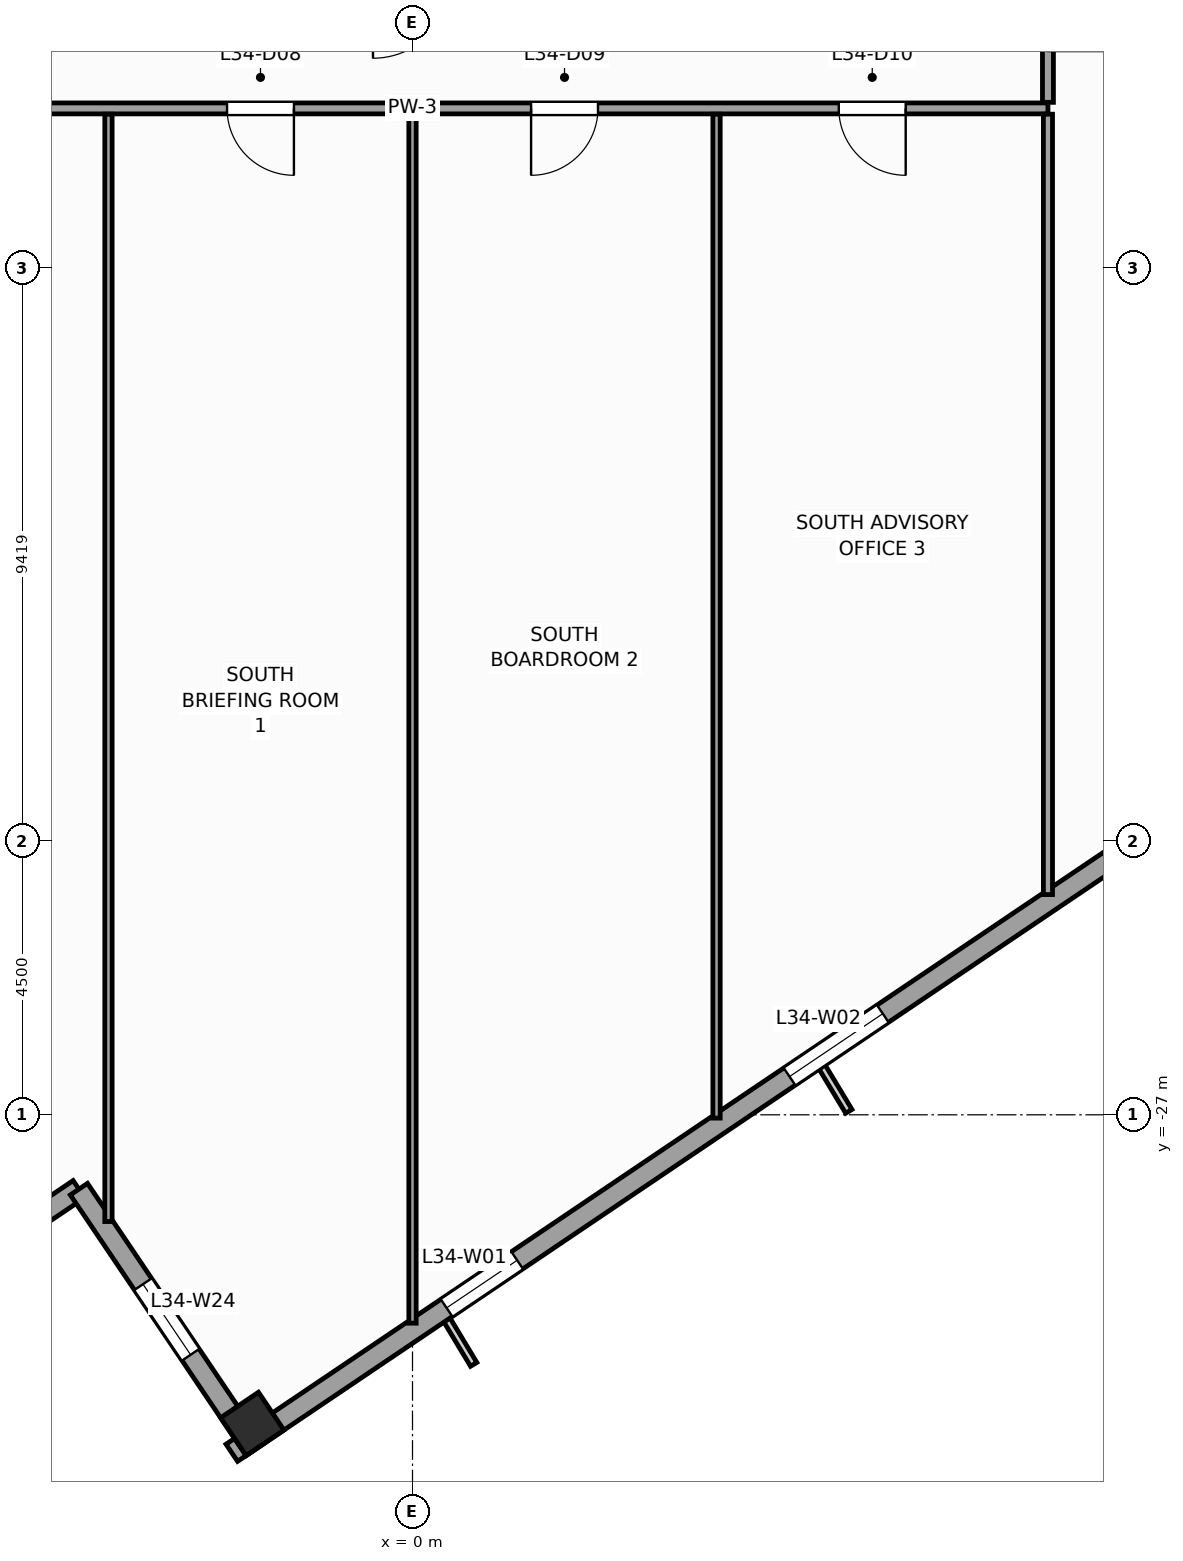
"""IFC4 building model, lengths in metres.
Left out: names, types, materials, properties, quantities, classifications, styles, units other than length and angle.
Written with IfcOpenShell. Run it as: python <this file> out.ifc"""

import sys

from ifc_helpers import new_model, si_unit, direction, frame, frame_2d, origin, origin_2d, place, context, subcontext, project, spatial, rectangle, extrude, source, transform, mapped, element, fill, save


model = new_model("IFC4")
c1 = context("Model", 3, precision=1e-05, world=origin(), true_north=direction((0.0, 1.0)))
c2 = subcontext(c1, "Body", "Model", "MODEL_VIEW")
j1 = project(units=[si_unit("LENGTHUNIT", "METRE"), si_unit("PLANEANGLEUNIT", "RADIAN")], contexts=[c1])
p1 = place(None, origin())
s1 = spatial("IfcSite", under=j1, at=p1, CompositionType="ELEMENT")
p2 = place(p1, origin())
s2 = spatial("IfcBuilding", under=s1, at=p2, CompositionType="ELEMENT")
p3 = place(p2, frame((0.0, 0.0, 144.4)))
s3 = spatial("IfcBuildingStorey", under=s2, at=p3, CompositionType="ELEMENT", Elevation=144.4)
m1 = source(origin(), c2, "Body", "SweptSolid", [
    extrude(rectangle(XDim=0.75, YDim=0.75, at=origin_2d()), origin(), (0.0, 0.0, 1.0), 4.0),
])
p4 = place(p3, frame((-2.635, -32.083, 0.0), z_axis=(0.0, 0.0, 1.0), x_axis=(0.829037572555, 0.559192903471, 0.0)))
e1 = element("IfcColumn", 1, at=p4, inside=s3, PredefinedType="COLUMN", context=c2, shape_type="MappedRepresentation", body=[
    mapped(m1, transform((0.0, 0.0, 0.0), scale=1.0)),
])
p5 = place(p3, frame((-2.972, -32.558, 0.0), z_axis=(0.0, 0.0, 1.0), x_axis=(0.829036218961, 0.559194910251, 0.0)))
e2 = element("IfcWall", 2, at=p5, inside=s3, PredefinedType="STANDARD", context=c2, shape_type="SweptSolid", body=[
    extrude(rectangle(XDim=41.34, YDim=0.34, at=frame_2d((20.67, 0.0))), origin(), (0.0, 0.0, 1.0), 3.04),
])
p6 = place(p5, frame((4.261, 0.0, 0.56)))
e3 = element("IfcOpeningElement", 3, at=p6, cuts=e2, PredefinedType="OPENING", context=c2, shape_type="SweptSolid", body=[
    extrude(rectangle(XDim=1.4, YDim=2.4, at=frame_2d((0.7, 1.2))), frame((0.0, 0.18, 0.0), z_axis=(0.0, -1.0, 0.0), x_axis=(1.0, 0.0, 0.0)), (0.0, 0.0, 1.0), 0.36),
])
p7 = place(p5, frame((11.064, 0.0, 0.61)))
e4 = element("IfcOpeningElement", 4, at=p7, cuts=e2, PredefinedType="OPENING", context=c2, shape_type="SweptSolid", body=[
    extrude(rectangle(XDim=1.85, YDim=2.35, at=frame_2d((0.925, 1.175))), frame((0.0, 0.18, 0.0), z_axis=(0.0, -1.0, 0.0), x_axis=(1.0, 0.0, 0.0)), (0.0, 0.0, 1.0), 0.36),
])
p8 = place(p5, frame((18.168, 0.0, 0.61)))
e5 = element("IfcOpeningElement", 5, at=p8, cuts=e2, PredefinedType="OPENING", context=c2, shape_type="SweptSolid", body=[
    extrude(rectangle(XDim=1.85, YDim=2.35, at=frame_2d((0.925, 1.175))), frame((0.0, 0.18, 0.0), z_axis=(0.0, -1.0, 0.0), x_axis=(1.0, 0.0, 0.0)), (0.0, 0.0, 1.0), 0.36),
])
p9 = place(p5, frame((27.186, 0.0, 0.61)))
e6 = element("IfcOpeningElement", 6, at=p9, cuts=e2, PredefinedType="OPENING", context=c2, shape_type="SweptSolid", body=[
    extrude(rectangle(XDim=1.85, YDim=2.35, at=frame_2d((0.925, 1.175))), frame((0.0, 0.18, 0.0), z_axis=(0.0, -1.0, 0.0), x_axis=(1.0, 0.0, 0.0)), (0.0, 0.0, 1.0), 0.36),
])
p10 = place(p5, frame((34.852, 0.0, 0.56)))
e7 = element("IfcOpeningElement", 7, at=p10, cuts=e2, PredefinedType="OPENING", context=c2, shape_type="SweptSolid", body=[
    extrude(rectangle(XDim=1.4, YDim=2.4, at=frame_2d((0.7, 1.2))), frame((0.0, 0.18, 0.0), z_axis=(0.0, -1.0, 0.0), x_axis=(1.0, 0.0, 0.0)), (0.0, 0.0, 1.0), 0.36),
])
p11 = place(p3, frame((-9.631, -31.019, 0.0), z_axis=(0.0, 0.0, 1.0), x_axis=(0.829025804298, 0.559210350234, 0.0)))
e8 = element("IfcWall", 8, at=p11, inside=s3, PredefinedType="STANDARD", context=c2, shape_type="SweptSolid", body=[
    extrude(rectangle(XDim=5.0, YDim=0.34, at=frame_2d((2.5, 0.0))), origin(), (0.0, 0.0, 1.0), 3.74),
])
p12 = place(p3, frame((-5.486, -28.223, 0.0), z_axis=(0.0, 0.0, 1.0), x_axis=(0.559171107879, -0.82905227345, 0.0)))
e9 = element("IfcWall", 9, at=p12, inside=s3, PredefinedType="STANDARD", context=c2, shape_type="SweptSolid", body=[
    extrude(rectangle(XDim=5.17, YDim=0.34, at=frame_2d((2.585, 0.0))), origin(), (0.0, 0.0, 1.0), 3.04),
])
p13 = place(p12, frame((1.885, 0.0, 0.56)))
e10 = element("IfcOpeningElement", 10, at=p13, cuts=e9, PredefinedType="OPENING", context=c2, shape_type="SweptSolid", body=[
    extrude(rectangle(XDim=1.4, YDim=2.4, at=frame_2d((0.7, 1.2))), frame((0.0, 0.18, 0.0), z_axis=(0.0, -1.0, 0.0), x_axis=(1.0, 0.0, 0.0)), (0.0, 0.0, 1.0), 0.36),
])
p14 = place(p3, frame((-10.45, -10.45, 0.0), z_axis=(0.0, 0.0, 1.0), x_axis=(1.0, 0.0, 0.0)))
e11 = element("IfcWall", 11, at=p14, inside=s3, PredefinedType="PARTITIONING", context=c2, shape_type="SweptSolid", body=[
    extrude(rectangle(XDim=20.9, YDim=0.18, at=frame_2d((10.45, 0.0))), origin(), (0.0, 0.0, 1.0), 3.74),
])
p15 = place(p14, frame((2.339, 0.0, 0.0)))
e12 = element("IfcOpeningElement", 12, at=p15, cuts=e11, PredefinedType="OPENING", context=c2, shape_type="SweptSolid", body=[
    extrude(rectangle(XDim=1.1, YDim=2.2, at=frame_2d((0.55, 1.1))), frame((0.0, 0.1, 0.0), z_axis=(0.0, -1.0, 0.0), x_axis=(1.0, 0.0, 0.0)), (0.0, 0.0, 1.0), 0.2),
])
p16 = place(p14, frame((7.4, 0.0, 0.0)))
e13 = element("IfcOpeningElement", 13, at=p16, cuts=e11, PredefinedType="OPENING", context=c2, shape_type="SweptSolid", body=[
    extrude(rectangle(XDim=1.1, YDim=2.2, at=frame_2d((0.55, 1.1))), frame((0.0, 0.1, 0.0), z_axis=(0.0, -1.0, 0.0), x_axis=(1.0, 0.0, 0.0)), (0.0, 0.0, 1.0), 0.2),
])
p17 = place(p14, frame((12.4, 0.0, 0.0)))
e14 = element("IfcOpeningElement", 14, at=p17, cuts=e11, PredefinedType="OPENING", context=c2, shape_type="SweptSolid", body=[
    extrude(rectangle(XDim=1.1, YDim=2.2, at=frame_2d((0.55, 1.1))), frame((0.0, 0.1, 0.0), z_axis=(0.0, -1.0, 0.0), x_axis=(1.0, 0.0, 0.0)), (0.0, 0.0, 1.0), 0.2),
])
p18 = place(p14, frame((17.46, 0.0, 0.0)))
e15 = element("IfcOpeningElement", 15, at=p18, cuts=e11, PredefinedType="OPENING", context=c2, shape_type="SweptSolid", body=[
    extrude(rectangle(XDim=1.1, YDim=2.2, at=frame_2d((0.55, 1.1))), frame((0.0, 0.1, 0.0), z_axis=(0.0, -1.0, 0.0), x_axis=(1.0, 0.0, 0.0)), (0.0, 0.0, 1.0), 0.2),
])
p19 = place(p3, frame((10.45, -10.35, 0.0), z_axis=(0.0, 0.0, 1.0), x_axis=(0.0, 1.0, 0.0)))
e16 = element("IfcWall", 16, at=p19, inside=s3, PredefinedType="PARTITIONING", context=c2, shape_type="SweptSolid", body=[
    extrude(rectangle(XDim=8.95, YDim=0.18, at=frame_2d((4.475, 0.0))), origin(), (0.0, 0.0, 1.0), 3.74),
])
p20 = place(p19, frame((1.455, 0.0, 0.0)))
e17 = element("IfcOpeningElement", 17, at=p20, cuts=e16, PredefinedType="OPENING", context=c2, shape_type="SweptSolid", body=[
    extrude(rectangle(XDim=0.95, YDim=2.1, at=frame_2d((0.475, 1.05))), frame((0.0, 0.1, 0.0), z_axis=(0.0, -1.0, 0.0), x_axis=(1.0, 0.0, 0.0)), (0.0, 0.0, 1.0), 0.2),
])
p21 = place(p19, frame((3.879, 0.0, 0.0)))
e18 = element("IfcOpeningElement", 18, at=p21, cuts=e16, PredefinedType="OPENING", context=c2, shape_type="SweptSolid", body=[
    extrude(rectangle(XDim=0.95, YDim=2.1, at=frame_2d((0.475, 1.05))), frame((0.0, 0.1, 0.0), z_axis=(0.0, -1.0, 0.0), x_axis=(1.0, 0.0, 0.0)), (0.0, 0.0, 1.0), 0.2),
])
p22 = place(p19, frame((6.494, 0.0, 0.0)))
e19 = element("IfcOpeningElement", 19, at=p22, cuts=e16, PredefinedType="OPENING", context=c2, shape_type="SweptSolid", body=[
    extrude(rectangle(XDim=1.1, YDim=2.2, at=frame_2d((0.55, 1.1))), frame((0.0, 0.1, 0.0), z_axis=(0.0, -1.0, 0.0), x_axis=(1.0, 0.0, 0.0)), (0.0, 0.0, 1.0), 0.2),
])
p23 = place(p3, frame((-5.0, -28.755, 0.0), z_axis=(0.0, 0.0, 1.0), x_axis=(0.0, 1.0, 0.0)))
e20 = element("IfcWall", 20, at=p23, inside=s3, PredefinedType="PARTITIONING", context=c2, shape_type="SweptSolid", body=[
    extrude(rectangle(XDim=18.21, YDim=0.12, at=frame_2d((9.105, 0.0))), origin(), (0.0, 0.0, 1.0), 3.74),
])
p24 = place(p3, frame((0.0, -30.427, 0.0), z_axis=(0.0, 0.0, 1.0), x_axis=(0.0, 1.0, 0.0)))
e21 = element("IfcWall", 21, at=p24, inside=s3, PredefinedType="PARTITIONING", context=c2, shape_type="SweptSolid", body=[
    extrude(rectangle(XDim=19.882, YDim=0.12, at=frame_2d((9.941, 0.0))), origin(), (0.0, 0.0, 1.0), 3.74),
])
p25 = place(p3, frame((5.0, -27.054, 0.0), z_axis=(0.0, 0.0, 1.0), x_axis=(0.0, 1.0, 0.0)))
e22 = element("IfcWall", 22, at=p25, inside=s3, PredefinedType="PARTITIONING", context=c2, shape_type="SweptSolid", body=[
    extrude(rectangle(XDim=16.509, YDim=0.12, at=frame_2d((8.255, 0.0))), origin(), (0.0, 0.0, 1.0), 3.74),
])
p26 = place(p3, frame((10.45, -23.378, 0.0), z_axis=(0.0, 0.0, 1.0), x_axis=(0.0, 1.0, 0.0)))
e23 = element("IfcWall", 23, at=p26, inside=s3, PredefinedType="PARTITIONING", context=c2, shape_type="SweptSolid", body=[
    extrude(rectangle(XDim=12.833, YDim=0.15, at=frame_2d((6.417, 0.0))), origin(), (0.0, 0.0, 1.0), 3.74),
])
m2 = source(origin(), c2, "Body", "SweptSolid", [
    extrude(rectangle(XDim=1.4, YDim=2.4, at=frame_2d((0.7, 1.2))), frame((0.0, 0.03, 0.0), z_axis=(0.0, -1.0, 0.0), x_axis=(1.0, 0.0, 0.0)), (0.0, 0.0, 1.0), 0.06),
])
p27 = place(p6, origin())
e24 = element("IfcWindow", 24, at=p27, inside=s3, PartitioningType="SINGLE_PANEL", PredefinedType="WINDOW", context=c2, shape_type="MappedRepresentation", body=[
    mapped(m2, transform((0.0, 0.0, 0.0), scale=1.0)),
])
fill(e3, e24)
m3 = source(origin(), c2, "Body", "SweptSolid", [
    extrude(rectangle(XDim=1.85, YDim=2.35, at=frame_2d((0.925, 1.175))), frame((0.0, 0.03, 0.0), z_axis=(0.0, -1.0, 0.0), x_axis=(1.0, 0.0, 0.0)), (0.0, 0.0, 1.0), 0.06),
])
p28 = place(p7, origin())
e25 = element("IfcWindow", 25, at=p28, inside=s3, PartitioningType="SINGLE_PANEL", PredefinedType="WINDOW", context=c2, shape_type="MappedRepresentation", body=[
    mapped(m3, transform((0.0, 0.0, 0.0), scale=1.0)),
])
fill(e4, e25)
p29 = place(p13, origin())
e26 = element("IfcWindow", 26, at=p29, inside=s3, PartitioningType="SINGLE_PANEL", PredefinedType="WINDOW", context=c2, shape_type="MappedRepresentation", body=[
    mapped(m2, transform((0.0, 0.0, 0.0), scale=1.0)),
])
fill(e10, e26)
m4 = source(origin(), c2, "Body", "SweptSolid", [
    extrude(rectangle(XDim=1.1, YDim=2.2, at=frame_2d((0.55, 1.1))), frame((0.0, 0.025, 0.0), z_axis=(0.0, -1.0, 0.0), x_axis=(1.0, 0.0, 0.0)), (0.0, 0.0, 1.0), 0.05),
])
p30 = place(p16, frame((1.1, 0.0, 0.0), z_axis=(0.0, 0.0, 1.0), x_axis=(-1.0, 0.0, 0.0)))
e27 = element("IfcDoor", 27, at=p30, inside=s3, OperationType="SINGLE_SWING_RIGHT", PredefinedType="DOOR", context=c2, shape_type="MappedRepresentation", body=[
    mapped(m4, transform((0.0, 0.0, 0.0), scale=1.0)),
])
fill(e13, e27)
p31 = place(p17, frame((1.1, 0.0, 0.0), z_axis=(0.0, 0.0, 1.0), x_axis=(-1.0, 0.0, 0.0)))
e28 = element("IfcDoor", 28, at=p31, inside=s3, OperationType="SINGLE_SWING_LEFT", PredefinedType="DOOR", context=c2, shape_type="MappedRepresentation", body=[
    mapped(m4, transform((0.0, 0.0, 0.0), scale=1.0)),
])
fill(e14, e28)
p32 = place(p18, frame((1.1, 0.0, 0.0), z_axis=(0.0, 0.0, 1.0), x_axis=(-1.0, 0.0, 0.0)))
e29 = element("IfcDoor", 29, at=p32, inside=s3, OperationType="SINGLE_SWING_RIGHT", PredefinedType="DOOR", context=c2, shape_type="MappedRepresentation", body=[
    mapped(m4, transform((0.0, 0.0, 0.0), scale=1.0)),
])
fill(e15, e29)
save(model, sys.argv[1])
